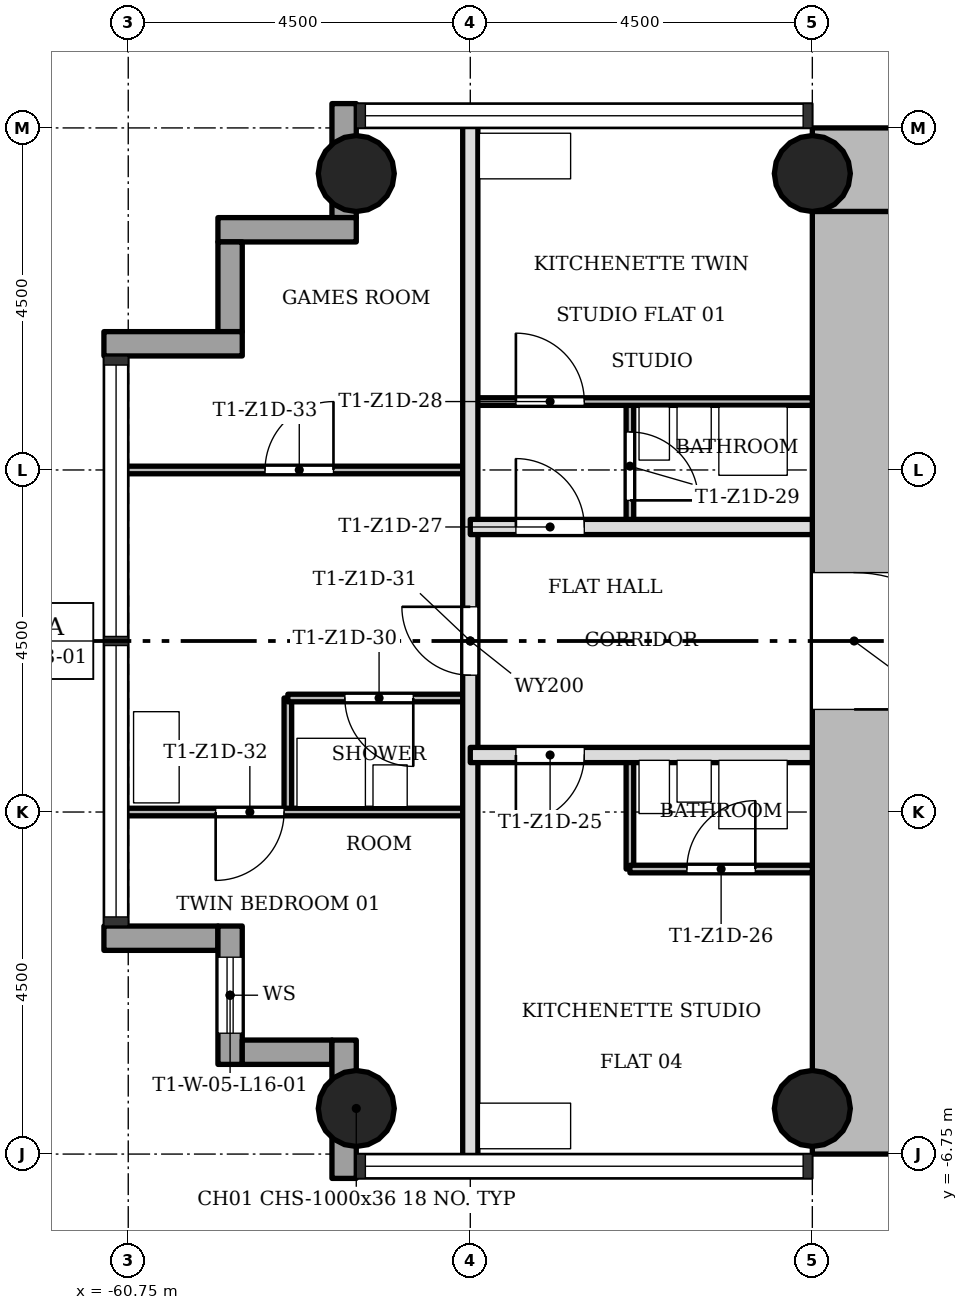
"""IFC4 building model, lengths in metres.
Left out: names, types, materials, properties, quantities, classifications, styles, units other than length and angle.
Written with IfcOpenShell. Run it as: python <this file> out.ifc"""

import sys

from ifc_helpers import new_model, si_unit, direction, frame, frame_2d, origin, origin_2d, place, context, subcontext, project, spatial, rectangle, hollow_circle, extrude, element, fill, save


model = new_model("IFC4")
c1 = context("Model", 3, precision=1e-05, world=origin(), true_north=direction((0.0, 1.0)))
c2 = subcontext(c1, "Body", "Model", "MODEL_VIEW")
j1 = project(units=[si_unit("LENGTHUNIT", "METRE"), si_unit("PLANEANGLEUNIT", "RADIAN")], contexts=[c1])
p1 = place(None, origin())
s1 = spatial("IfcSite", under=j1, at=p1, CompositionType="ELEMENT")
p2 = place(p1, origin())
s2 = spatial("IfcBuilding", under=s1, at=p2, CompositionType="ELEMENT")
p3 = place(p2, frame((0.0, 0.0, 61.9)))
s3 = spatial("IfcBuildingStorey", under=s2, at=p3, CompositionType="ELEMENT", Elevation=61.9)
p4 = place(p3, frame((-43.85, 6.2, 0.0), z_axis=(0.0, 0.0, 1.0), x_axis=(-1.0, 0.0, 0.0)))
e1 = element("IfcWall", 1, at=p4, inside=s3, PredefinedType="SHEAR", context=c2, shape_type="SweptSolid", body=[
    extrude(rectangle(XDim=7.9, YDim=1.1, at=frame_2d((3.95, 0.0))), origin(), (0.0, 0.0, 1.0), 3.4),
])
p5 = place(p3, frame((-51.2, 5.65, 0.0), z_axis=(0.0, 0.0, 1.0), x_axis=(0.0, -1.0, 0.0)))
e2 = element("IfcWall", 2, at=p5, inside=s3, PredefinedType="SHEAR", context=c2, shape_type="SweptSolid", body=[
    extrude(rectangle(XDim=12.4, YDim=1.1, at=frame_2d((6.2, 0.0))), origin(), (0.0, 0.0, 1.0), 3.4),
])
p6 = place(p5, frame((4.75, 0.0, 0.0)))
e3 = element("IfcOpeningElement", 3, at=p6, cuts=e2, PredefinedType="OPENING", context=c2, shape_type="SweptSolid", body=[
    extrude(rectangle(XDim=1.8, YDim=2.1, at=frame_2d((0.9, 1.05))), frame((0.0, 0.56, 0.0), z_axis=(0.0, -1.0, 0.0), x_axis=(1.0, 0.0, 0.0)), (0.0, 0.0, 1.0), 1.12),
])
for number, where, z_axis, x_axis in (
    (4, (-51.75, -6.15, 0.0), (0.0, 0.0, 1.0), (1.0, 0.0, 0.0)),
    (5, (-51.75, 6.15, 0.0), (0.0, 0.0, 1.0), (1.0, 0.0, 0.0)),
    (6, (-57.75, -6.15, 0.0), (0.0, 0.0, 1.0), (1.0, 0.0, 0.0)),
    (7, (-57.75, 6.15, 0.0), (0.0, 0.0, 1.0), (1.0, 0.0, 0.0)),
):
    element("IfcColumn", number, at=place(p3, frame(where, z_axis=z_axis, x_axis=x_axis)), inside=s3, PredefinedType="COLUMN", context=c2, shape_type="SweptSolid", body=[
        extrude(hollow_circle(Radius=0.5, WallThickness=0.036, at=origin_2d()), origin(), (0.0, 0.0, 1.0), 3.4),
    ])
p7 = place(p3, frame((-61.07, -3.91, -0.3), z_axis=(0.0, 0.0, 1.0), x_axis=(1.0, 0.0, 0.0)))
e8 = element("IfcWall", 8, at=p7, inside=s3, PredefinedType="STANDARD", context=c2, shape_type="SweptSolid", body=[
    extrude(rectangle(XDim=1.5, YDim=0.32, at=frame_2d((0.75, 0.0))), origin(), (0.0, 0.0, 1.0), 3.4),
])
p8 = place(p3, frame((-59.41, -3.75, -0.3), z_axis=(0.0, 0.0, 1.0), x_axis=(0.0, -1.0, 0.0)))
e9 = element("IfcWall", 9, at=p8, inside=s3, PredefinedType="STANDARD", context=c2, shape_type="SweptSolid", body=[
    extrude(rectangle(XDim=1.82, YDim=0.32, at=frame_2d((0.91, 0.0))), origin(), (0.0, 0.0, 1.0), 3.4),
])
p9 = place(p8, frame((0.41, 0.0, 1.2)))
e10 = element("IfcOpeningElement", 10, at=p9, cuts=e9, PredefinedType="OPENING", context=c2, shape_type="SweptSolid", body=[
    extrude(rectangle(XDim=1.0, YDim=1.5, at=frame_2d((0.5, 0.75))), frame((0.0, 0.17, 0.0), z_axis=(0.0, -1.0, 0.0), x_axis=(1.0, 0.0, 0.0)), (0.0, 0.0, 1.0), 0.34),
])
p10 = place(p3, frame((-59.25, -5.41, -0.3), z_axis=(0.0, 0.0, 1.0), x_axis=(1.0, 0.0, 0.0)))
e11 = element("IfcWall", 11, at=p10, inside=s3, PredefinedType="STANDARD", context=c2, shape_type="SweptSolid", body=[
    extrude(rectangle(XDim=1.18, YDim=0.32, at=frame_2d((0.59, 0.0))), origin(), (0.0, 0.0, 1.0), 3.4),
])
p11 = place(p3, frame((-57.91, -5.25, -0.3), z_axis=(0.0, 0.0, 1.0), x_axis=(0.0, -1.0, 0.0)))
e12 = element("IfcWall", 12, at=p11, inside=s3, PredefinedType="STANDARD", context=c2, shape_type="SweptSolid", body=[
    extrude(rectangle(XDim=1.82, YDim=0.32, at=frame_2d((0.91, 0.0))), origin(), (0.0, 0.0, 1.0), 3.4),
])
p12 = place(p3, frame((-57.91, 7.07, -0.3), z_axis=(0.0, 0.0, 1.0), x_axis=(0.0, -1.0, 0.0)))
e13 = element("IfcWall", 13, at=p12, inside=s3, PredefinedType="STANDARD", context=c2, shape_type="SweptSolid", body=[
    extrude(rectangle(XDim=1.5, YDim=0.32, at=frame_2d((0.75, 0.0))), origin(), (0.0, 0.0, 1.0), 3.4),
])
p13 = place(p3, frame((-57.75, 5.41, -0.3), z_axis=(0.0, 0.0, 1.0), x_axis=(-1.0, 0.0, 0.0)))
e14 = element("IfcWall", 14, at=p13, inside=s3, PredefinedType="STANDARD", context=c2, shape_type="SweptSolid", body=[
    extrude(rectangle(XDim=1.82, YDim=0.32, at=frame_2d((0.91, 0.0))), origin(), (0.0, 0.0, 1.0), 3.4),
])
p14 = place(p3, frame((-59.41, 5.25, -0.3), z_axis=(0.0, 0.0, 1.0), x_axis=(0.0, -1.0, 0.0)))
e15 = element("IfcWall", 15, at=p14, inside=s3, PredefinedType="STANDARD", context=c2, shape_type="SweptSolid", body=[
    extrude(rectangle(XDim=1.18, YDim=0.32, at=frame_2d((0.59, 0.0))), origin(), (0.0, 0.0, 1.0), 3.4),
])
p15 = place(p3, frame((-59.25, 3.91, -0.3), z_axis=(0.0, 0.0, 1.0), x_axis=(-1.0, 0.0, 0.0)))
e16 = element("IfcWall", 16, at=p15, inside=s3, PredefinedType="STANDARD", context=c2, shape_type="SweptSolid", body=[
    extrude(rectangle(XDim=1.82, YDim=0.32, at=frame_2d((0.91, 0.0))), origin(), (0.0, 0.0, 1.0), 3.4),
])
p16 = place(p3, frame((-58.65, -2.25, 0.0), z_axis=(0.0, 0.0, 1.0), x_axis=(0.0, 1.0, 0.0)))
e17 = element("IfcWall", 17, at=p16, inside=s3, PredefinedType="PARTITIONING", context=c2, shape_type="SweptSolid", body=[
    extrude(rectangle(XDim=1.5, YDim=0.1, at=frame_2d((0.75, 0.0))), origin(), (0.0, 0.0, 1.0), 3.0),
])
p17 = place(p3, frame((-56.25, -6.85, 0.0), z_axis=(0.0, 0.0, 1.0), x_axis=(0.0, 1.0, 0.0)))
e18 = element("IfcWall", 18, at=p17, inside=s3, PredefinedType="SOLIDWALL", context=c2, shape_type="SweptSolid", body=[
    extrude(rectangle(XDim=13.7, YDim=0.2, at=frame_2d((6.85, 0.0))), origin(), (0.0, 0.0, 1.0), 3.0),
])
p18 = place(p17, frame((6.4, 0.0, 0.0)))
e19 = element("IfcOpeningElement", 19, at=p18, cuts=e18, PredefinedType="OPENING", context=c2, shape_type="SweptSolid", body=[
    extrude(rectangle(XDim=0.9, YDim=2.1, at=frame_2d((0.45, 1.05))), frame((0.0, 0.11, 0.0), z_axis=(0.0, -1.0, 0.0), x_axis=(1.0, 0.0, 0.0)), (0.0, 0.0, 1.0), 0.22),
])
p19 = place(p3, frame((-54.15, -3.0, 0.0), z_axis=(0.0, 0.0, 1.0), x_axis=(0.0, 1.0, 0.0)))
e20 = element("IfcWall", 20, at=p19, inside=s3, PredefinedType="PARTITIONING", context=c2, shape_type="SweptSolid", body=[
    extrude(rectangle(XDim=1.5, YDim=0.1, at=frame_2d((0.75, 0.0))), origin(), (0.0, 0.0, 1.0), 3.0),
])
p20 = place(p3, frame((-54.15, 1.5, 0.0), z_axis=(0.0, 0.0, 1.0), x_axis=(0.0, 1.0, 0.0)))
e21 = element("IfcWall", 21, at=p20, inside=s3, PredefinedType="PARTITIONING", context=c2, shape_type="SweptSolid", body=[
    extrude(rectangle(XDim=1.65, YDim=0.1, at=frame_2d((0.825, 0.0))), origin(), (0.0, 0.0, 1.0), 3.0),
])
p21 = place(p20, frame((0.35, 0.0, 0.0)))
e22 = element("IfcOpeningElement", 22, at=p21, cuts=e21, PredefinedType="OPENING", context=c2, shape_type="SweptSolid", body=[
    extrude(rectangle(XDim=0.9, YDim=2.1, at=frame_2d((0.45, 1.05))), frame((0.0, 0.06, 0.0), z_axis=(0.0, -1.0, 0.0), x_axis=(1.0, 0.0, 0.0)), (0.0, 0.0, 1.0), 0.12),
])
p22 = place(p3, frame((-54.15, -3.0, 0.0), z_axis=(0.0, 0.0, 1.0), x_axis=(1.0, 0.0, 0.0)))
e23 = element("IfcWall", 23, at=p22, inside=s3, PredefinedType="PARTITIONING", context=c2, shape_type="SweptSolid", body=[
    extrude(rectangle(XDim=2.4, YDim=0.1, at=frame_2d((1.2, 0.0))), origin(), (0.0, 0.0, 1.0), 3.0),
])
p23 = place(p22, frame((0.75, 0.0, 0.0)))
e24 = element("IfcOpeningElement", 24, at=p23, cuts=e23, PredefinedType="OPENING", context=c2, shape_type="SweptSolid", body=[
    extrude(rectangle(XDim=0.9, YDim=2.1, at=frame_2d((0.45, 1.05))), frame((0.0, 0.06, 0.0), z_axis=(0.0, -1.0, 0.0), x_axis=(1.0, 0.0, 0.0)), (0.0, 0.0, 1.0), 0.12),
])
p24 = place(p3, frame((-60.85, -2.25, 0.0), z_axis=(0.0, 0.0, 1.0), x_axis=(1.0, 0.0, 0.0)))
e25 = element("IfcWall", 25, at=p24, inside=s3, PredefinedType="PARTITIONING", context=c2, shape_type="SweptSolid", body=[
    extrude(rectangle(XDim=4.6, YDim=0.1, at=frame_2d((2.3, 0.0))), origin(), (0.0, 0.0, 1.0), 3.0),
])
p25 = place(p24, frame((1.25, 0.0, 0.0)))
e26 = element("IfcOpeningElement", 26, at=p25, cuts=e25, PredefinedType="OPENING", context=c2, shape_type="SweptSolid", body=[
    extrude(rectangle(XDim=0.9, YDim=2.1, at=frame_2d((0.45, 1.05))), frame((0.0, 0.06, 0.0), z_axis=(0.0, -1.0, 0.0), x_axis=(1.0, 0.0, 0.0)), (0.0, 0.0, 1.0), 0.12),
])
p26 = place(p3, frame((-56.25, -1.5, 0.0), z_axis=(0.0, 0.0, 1.0), x_axis=(1.0, 0.0, 0.0)))
e27 = element("IfcWall", 27, at=p26, inside=s3, PredefinedType="SOLIDWALL", context=c2, shape_type="SweptSolid", body=[
    extrude(rectangle(XDim=4.5, YDim=0.2, at=frame_2d((2.25, 0.0))), origin(), (0.0, 0.0, 1.0), 3.0),
])
p27 = place(p26, frame((0.6, 0.0, 0.0)))
e28 = element("IfcOpeningElement", 28, at=p27, cuts=e27, PredefinedType="OPENING", context=c2, shape_type="SweptSolid", body=[
    extrude(rectangle(XDim=0.9, YDim=2.1, at=frame_2d((0.45, 1.05))), frame((0.0, 0.11, 0.0), z_axis=(0.0, -1.0, 0.0), x_axis=(1.0, 0.0, 0.0)), (0.0, 0.0, 1.0), 0.22),
])
p28 = place(p3, frame((-58.65, -0.75, 0.0), z_axis=(0.0, 0.0, 1.0), x_axis=(1.0, 0.0, 0.0)))
e29 = element("IfcWall", 29, at=p28, inside=s3, PredefinedType="PARTITIONING", context=c2, shape_type="SweptSolid", body=[
    extrude(rectangle(XDim=2.4, YDim=0.1, at=frame_2d((1.2, 0.0))), origin(), (0.0, 0.0, 1.0), 3.0),
])
p29 = place(p28, frame((0.75, 0.0, 0.0)))
e30 = element("IfcOpeningElement", 30, at=p29, cuts=e29, PredefinedType="OPENING", context=c2, shape_type="SweptSolid", body=[
    extrude(rectangle(XDim=0.9, YDim=2.1, at=frame_2d((0.45, 1.05))), frame((0.0, 0.06, 0.0), z_axis=(0.0, -1.0, 0.0), x_axis=(1.0, 0.0, 0.0)), (0.0, 0.0, 1.0), 0.12),
])
p30 = place(p3, frame((-56.25, 1.5, 0.0), z_axis=(0.0, 0.0, 1.0), x_axis=(1.0, 0.0, 0.0)))
e31 = element("IfcWall", 31, at=p30, inside=s3, PredefinedType="SOLIDWALL", context=c2, shape_type="SweptSolid", body=[
    extrude(rectangle(XDim=4.5, YDim=0.2, at=frame_2d((2.25, 0.0))), origin(), (0.0, 0.0, 1.0), 3.0),
])
p31 = place(p30, frame((0.6, 0.0, 0.0)))
e32 = element("IfcOpeningElement", 32, at=p31, cuts=e31, PredefinedType="OPENING", context=c2, shape_type="SweptSolid", body=[
    extrude(rectangle(XDim=0.9, YDim=2.1, at=frame_2d((0.45, 1.05))), frame((0.0, 0.11, 0.0), z_axis=(0.0, -1.0, 0.0), x_axis=(1.0, 0.0, 0.0)), (0.0, 0.0, 1.0), 0.22),
])
p32 = place(p3, frame((-60.85, 2.25, 0.0), z_axis=(0.0, 0.0, 1.0), x_axis=(1.0, 0.0, 0.0)))
e33 = element("IfcWall", 33, at=p32, inside=s3, PredefinedType="PARTITIONING", context=c2, shape_type="SweptSolid", body=[
    extrude(rectangle(XDim=4.6, YDim=0.1, at=frame_2d((2.3, 0.0))), origin(), (0.0, 0.0, 1.0), 3.0),
])
p33 = place(p32, frame((1.9, 0.0, 0.0)))
e34 = element("IfcOpeningElement", 34, at=p33, cuts=e33, PredefinedType="OPENING", context=c2, shape_type="SweptSolid", body=[
    extrude(rectangle(XDim=0.9, YDim=2.1, at=frame_2d((0.45, 1.05))), frame((0.0, 0.06, 0.0), z_axis=(0.0, -1.0, 0.0), x_axis=(1.0, 0.0, 0.0)), (0.0, 0.0, 1.0), 0.12),
])
p34 = place(p3, frame((-56.25, 3.15, 0.0), z_axis=(0.0, 0.0, 1.0), x_axis=(1.0, 0.0, 0.0)))
e35 = element("IfcWall", 35, at=p34, inside=s3, PredefinedType="PARTITIONING", context=c2, shape_type="SweptSolid", body=[
    extrude(rectangle(XDim=4.5, YDim=0.1, at=frame_2d((2.25, 0.0))), origin(), (0.0, 0.0, 1.0), 3.0),
])
p35 = place(p34, frame((0.6, 0.0, 0.0)))
e36 = element("IfcOpeningElement", 36, at=p35, cuts=e35, PredefinedType="OPENING", context=c2, shape_type="SweptSolid", body=[
    extrude(rectangle(XDim=0.9, YDim=2.1, at=frame_2d((0.45, 1.05))), frame((0.0, 0.06, 0.0), z_axis=(0.0, -1.0, 0.0), x_axis=(1.0, 0.0, 0.0)), (0.0, 0.0, 1.0), 0.12),
])
p36 = place(p27, origin())
e37 = element("IfcDoor", 37, at=p36, inside=s3, OperationType="SINGLE_SWING_LEFT", PredefinedType="DOOR", context=c2, shape_type="SweptSolid", body=[
    extrude(rectangle(XDim=0.9, YDim=2.1, at=frame_2d((0.45, 1.05))), frame((0.0, 0.025, 0.0), z_axis=(0.0, -1.0, 0.0), x_axis=(1.0, 0.0, 0.0)), (0.0, 0.0, 1.0), 0.05),
])
fill(e28, e37)
p37 = place(p23, origin())
e38 = element("IfcDoor", 38, at=p37, inside=s3, OperationType="SINGLE_SWING_LEFT", PredefinedType="DOOR", context=c2, shape_type="SweptSolid", body=[
    extrude(rectangle(XDim=0.9, YDim=2.1, at=frame_2d((0.45, 1.05))), frame((0.0, 0.025, 0.0), z_axis=(0.0, -1.0, 0.0), x_axis=(1.0, 0.0, 0.0)), (0.0, 0.0, 1.0), 0.05),
])
fill(e24, e38)
p38 = place(p31, origin())
e39 = element("IfcDoor", 39, at=p38, inside=s3, OperationType="SINGLE_SWING_RIGHT", PredefinedType="DOOR", context=c2, shape_type="SweptSolid", body=[
    extrude(rectangle(XDim=0.9, YDim=2.1, at=frame_2d((0.45, 1.05))), frame((0.0, 0.025, 0.0), z_axis=(0.0, -1.0, 0.0), x_axis=(1.0, 0.0, 0.0)), (0.0, 0.0, 1.0), 0.05),
])
fill(e32, e39)
p39 = place(p35, origin())
e40 = element("IfcDoor", 40, at=p39, inside=s3, OperationType="SINGLE_SWING_RIGHT", PredefinedType="DOOR", context=c2, shape_type="SweptSolid", body=[
    extrude(rectangle(XDim=0.9, YDim=2.1, at=frame_2d((0.45, 1.05))), frame((0.0, 0.025, 0.0), z_axis=(0.0, -1.0, 0.0), x_axis=(1.0, 0.0, 0.0)), (0.0, 0.0, 1.0), 0.05),
])
fill(e36, e40)
p40 = place(p21, origin())
e41 = element("IfcDoor", 41, at=p40, inside=s3, OperationType="SINGLE_SWING_LEFT", PredefinedType="DOOR", context=c2, shape_type="SweptSolid", body=[
    extrude(rectangle(XDim=0.9, YDim=2.1, at=frame_2d((0.45, 1.05))), frame((0.0, 0.025, 0.0), z_axis=(0.0, -1.0, 0.0), x_axis=(1.0, 0.0, 0.0)), (0.0, 0.0, 1.0), 0.05),
])
fill(e22, e41)
p41 = place(p29, origin())
e42 = element("IfcDoor", 42, at=p41, inside=s3, OperationType="SINGLE_SWING_RIGHT", PredefinedType="DOOR", context=c2, shape_type="SweptSolid", body=[
    extrude(rectangle(XDim=0.9, YDim=2.1, at=frame_2d((0.45, 1.05))), frame((0.0, 0.025, 0.0), z_axis=(0.0, -1.0, 0.0), x_axis=(1.0, 0.0, 0.0)), (0.0, 0.0, 1.0), 0.05),
])
fill(e30, e42)
p42 = place(p18, origin())
e43 = element("IfcDoor", 43, at=p42, inside=s3, OperationType="SINGLE_SWING_LEFT", PredefinedType="DOOR", context=c2, shape_type="SweptSolid", body=[
    extrude(rectangle(XDim=0.9, YDim=2.1, at=frame_2d((0.45, 1.05))), frame((0.0, 0.025, 0.0), z_axis=(0.0, -1.0, 0.0), x_axis=(1.0, 0.0, 0.0)), (0.0, 0.0, 1.0), 0.05),
])
fill(e19, e43)
p43 = place(p25, origin())
e44 = element("IfcDoor", 44, at=p43, inside=s3, OperationType="SINGLE_SWING_LEFT", PredefinedType="DOOR", context=c2, shape_type="SweptSolid", body=[
    extrude(rectangle(XDim=0.9, YDim=2.1, at=frame_2d((0.45, 1.05))), frame((0.0, 0.025, 0.0), z_axis=(0.0, -1.0, 0.0), x_axis=(1.0, 0.0, 0.0)), (0.0, 0.0, 1.0), 0.05),
])
fill(e26, e44)
p44 = place(p33, origin())
e45 = element("IfcDoor", 45, at=p44, inside=s3, OperationType="SINGLE_SWING_LEFT", PredefinedType="DOOR", context=c2, shape_type="SweptSolid", body=[
    extrude(rectangle(XDim=0.9, YDim=2.1, at=frame_2d((0.45, 1.05))), frame((0.0, 0.025, 0.0), z_axis=(0.0, -1.0, 0.0), x_axis=(1.0, 0.0, 0.0)), (0.0, 0.0, 1.0), 0.05),
])
fill(e34, e45)
p45 = place(p6, origin())
e46 = element("IfcDoor", 46, at=p45, inside=s3, OperationType="SINGLE_SWING_LEFT", PredefinedType="DOOR", context=c2, shape_type="SweptSolid", body=[
    extrude(rectangle(XDim=1.8, YDim=2.1, at=frame_2d((0.9, 1.05))), frame((0.0, 0.025, 0.0), z_axis=(0.0, -1.0, 0.0), x_axis=(1.0, 0.0, 0.0)), (0.0, 0.0, 1.0), 0.05),
])
fill(e3, e46)
p46 = place(p9, origin())
e47 = element("IfcWindow", 47, at=p46, inside=s3, PartitioningType="SINGLE_PANEL", PredefinedType="WINDOW", context=c2, shape_type="SweptSolid", body=[
    extrude(rectangle(XDim=1.0, YDim=1.5, at=frame_2d((0.5, 0.75))), frame((0.0, 0.03, 0.0), z_axis=(0.0, -1.0, 0.0), x_axis=(1.0, 0.0, 0.0)), (0.0, 0.0, 1.0), 0.06),
])
fill(e10, e47)
save(model, sys.argv[1])
